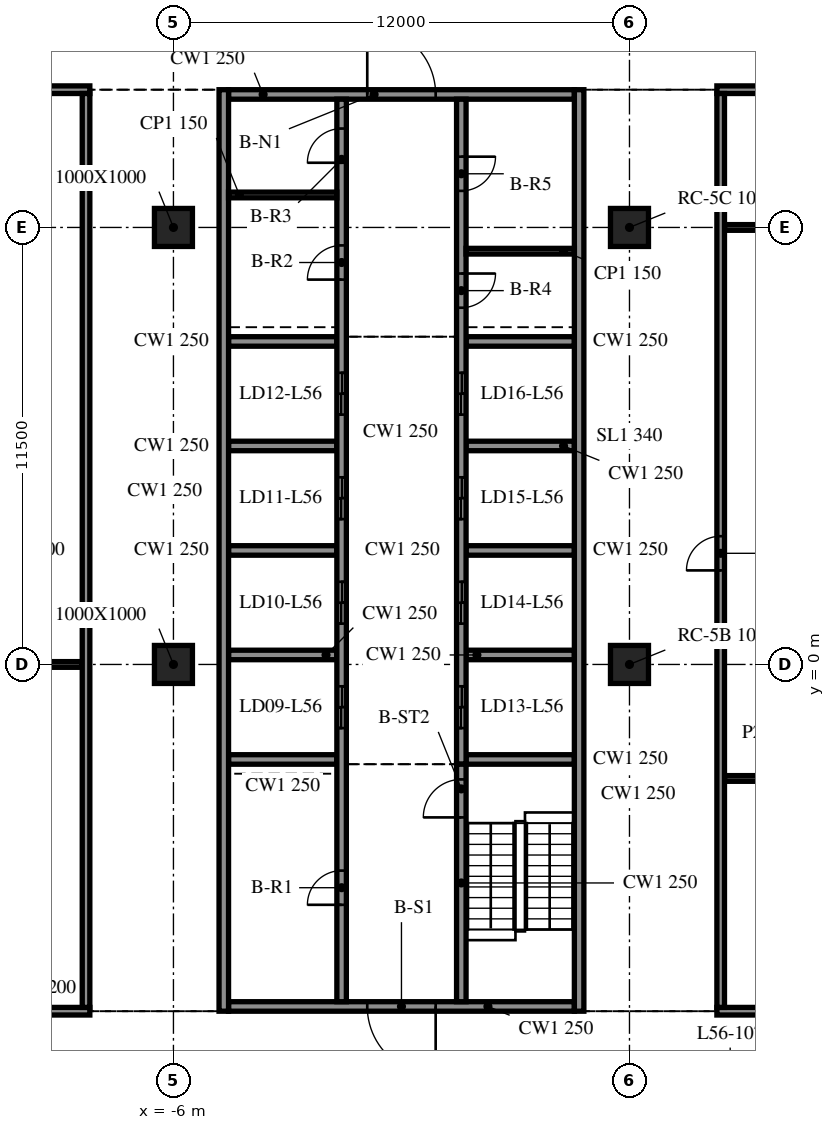
"""IFC4 building model, lengths in metres.
Left out: names, types, materials, properties, quantities, classifications, styles, units other than length and angle.
Written with IfcOpenShell. Run it as: python <this file> out.ifc"""

import sys

from ifc_helpers import new_model, si_unit, direction, frame, frame_2d, origin, origin_2d, place, context, subcontext, project, spatial, rectangle, extrude, element, fill, save


model = new_model("IFC4")
c1 = context("Model", 3, precision=1e-05, world=origin(), true_north=direction((0.0, 1.0)))
c2 = subcontext(c1, "Body", "Model", "MODEL_VIEW")
j1 = project(units=[si_unit("LENGTHUNIT", "METRE"), si_unit("PLANEANGLEUNIT", "RADIAN")], contexts=[c1])
p1 = place(None, origin())
s1 = spatial("IfcSite", under=j1, at=p1, CompositionType="ELEMENT")
p2 = place(p1, origin())
s2 = spatial("IfcBuilding", under=s1, at=p2, CompositionType="ELEMENT")
p3 = place(p2, frame((0.0, 0.0, 232.4)))
s3 = spatial("IfcBuildingStorey", under=s2, at=p3, CompositionType="ELEMENT", Elevation=232.4)
for number, where, z_axis, x_axis in (
    (1, (-6.0, 0.0, -0.34), (0.0, 0.0, 1.0), (1.0, 0.0, 0.0)),
    (2, (-6.0, 11.5, -0.34), (0.0, 0.0, 1.0), (1.0, 0.0, 0.0)),
    (3, (6.0, 0.0, -0.34), (0.0, 0.0, 1.0), (1.0, 0.0, 0.0)),
    (4, (6.0, 11.5, -0.34), (0.0, 0.0, 1.0), (1.0, 0.0, 0.0)),
):
    element("IfcColumn", number, at=place(p3, frame(where, z_axis=z_axis, x_axis=x_axis)), inside=s3, PredefinedType="COLUMN", context=c2, shape_type="SweptSolid", body=[
        extrude(rectangle(XDim=1.0, YDim=1.0, at=origin_2d()), origin(), (0.0, 0.0, 1.0), 3.8),
    ])
for number, where, z_axis, x_axis in (
    (5, (-4.675, 15.125, 0.0), (0.0, 0.0, 1.0), (0.0, -1.0, 0.0)),
    (6, (4.675, -9.125, 0.0), (0.0, 0.0, 1.0), (0.0, 1.0, 0.0)),
):
    element("IfcWall", number, at=place(p3, frame(where, z_axis=z_axis, x_axis=x_axis)), inside=s3, PredefinedType="SOLIDWALL", context=c2, shape_type="SweptSolid", body=[
        extrude(rectangle(XDim=24.25, YDim=0.25, at=frame_2d((12.125, 0.0))), origin(), (0.0, 0.0, 1.0), 3.46),
    ])
p4 = place(p3, frame((4.55, -9.0, 0.0), z_axis=(0.0, 0.0, 1.0), x_axis=(-1.0, 0.0, 0.0)))
e7 = element("IfcWall", 7, at=p4, inside=s3, PredefinedType="SOLIDWALL", context=c2, shape_type="SweptSolid", body=[
    extrude(rectangle(XDim=9.1, YDim=0.25, at=frame_2d((4.55, 0.0))), origin(), (0.0, 0.0, 1.0), 3.46),
])
p5 = place(p4, frame((3.65, 0.0, 0.0)))
e8 = element("IfcOpeningElement", 8, at=p5, cuts=e7, PredefinedType="OPENING", context=c2, shape_type="SweptSolid", body=[
    extrude(rectangle(XDim=1.8, YDim=2.1, at=frame_2d((0.9, 1.05))), frame((0.0, 0.135, 0.0), z_axis=(0.0, -1.0, 0.0), x_axis=(1.0, 0.0, 0.0)), (0.0, 0.0, 1.0), 0.27),
])
p6 = place(p3, frame((-4.55, 15.0, 0.0), z_axis=(0.0, 0.0, 1.0), x_axis=(1.0, 0.0, 0.0)))
e9 = element("IfcWall", 9, at=p6, inside=s3, PredefinedType="SOLIDWALL", context=c2, shape_type="SweptSolid", body=[
    extrude(rectangle(XDim=9.1, YDim=0.25, at=frame_2d((4.55, 0.0))), origin(), (0.0, 0.0, 1.0), 3.46),
])
p7 = place(p6, frame((3.65, 0.0, 0.0)))
e10 = element("IfcOpeningElement", 10, at=p7, cuts=e9, PredefinedType="OPENING", context=c2, shape_type="SweptSolid", body=[
    extrude(rectangle(XDim=1.8, YDim=2.1, at=frame_2d((0.9, 1.05))), frame((0.0, 0.135, 0.0), z_axis=(0.0, -1.0, 0.0), x_axis=(1.0, 0.0, 0.0)), (0.0, 0.0, 1.0), 0.27),
])
p8 = place(p3, frame((-1.575, -8.875, 0.0), z_axis=(0.0, 0.0, 1.0), x_axis=(0.0, 1.0, 0.0)))
e11 = element("IfcWall", 11, at=p8, inside=s3, PredefinedType="SOLIDWALL", context=c2, shape_type="SweptSolid", body=[
    extrude(rectangle(XDim=23.75, YDim=0.25, at=frame_2d((11.875, 0.0))), origin(), (0.0, 0.0, 1.0), 3.46),
])
p9 = place(p8, frame((7.2, 0.0, 0.0)))
e12 = element("IfcOpeningElement", 12, at=p9, cuts=e11, PredefinedType="OPENING", context=c2, shape_type="SweptSolid", body=[
    extrude(rectangle(XDim=1.1, YDim=2.1, at=frame_2d((0.55, 1.05))), frame((0.0, 0.135, 0.0), z_axis=(0.0, -1.0, 0.0), x_axis=(1.0, 0.0, 0.0)), (0.0, 0.0, 1.0), 0.27),
])
p10 = place(p8, frame((9.95, 0.0, 0.0)))
e13 = element("IfcOpeningElement", 13, at=p10, cuts=e11, PredefinedType="OPENING", context=c2, shape_type="SweptSolid", body=[
    extrude(rectangle(XDim=1.1, YDim=2.1, at=frame_2d((0.55, 1.05))), frame((0.0, 0.135, 0.0), z_axis=(0.0, -1.0, 0.0), x_axis=(1.0, 0.0, 0.0)), (0.0, 0.0, 1.0), 0.27),
])
p11 = place(p8, frame((12.7, 0.0, 0.0)))
e14 = element("IfcOpeningElement", 14, at=p11, cuts=e11, PredefinedType="OPENING", context=c2, shape_type="SweptSolid", body=[
    extrude(rectangle(XDim=1.1, YDim=2.1, at=frame_2d((0.55, 1.05))), frame((0.0, 0.135, 0.0), z_axis=(0.0, -1.0, 0.0), x_axis=(1.0, 0.0, 0.0)), (0.0, 0.0, 1.0), 0.27),
])
p12 = place(p8, frame((15.45, 0.0, 0.0)))
e15 = element("IfcOpeningElement", 15, at=p12, cuts=e11, PredefinedType="OPENING", context=c2, shape_type="SweptSolid", body=[
    extrude(rectangle(XDim=1.1, YDim=2.1, at=frame_2d((0.55, 1.05))), frame((0.0, 0.135, 0.0), z_axis=(0.0, -1.0, 0.0), x_axis=(1.0, 0.0, 0.0)), (0.0, 0.0, 1.0), 0.27),
])
p13 = place(p8, frame((2.55, 0.0, 0.0)))
e16 = element("IfcOpeningElement", 16, at=p13, cuts=e11, PredefinedType="OPENING", context=c2, shape_type="SweptSolid", body=[
    extrude(rectangle(XDim=0.9, YDim=2.1, at=frame_2d((0.45, 1.05))), frame((0.0, 0.135, 0.0), z_axis=(0.0, -1.0, 0.0), x_axis=(1.0, 0.0, 0.0)), (0.0, 0.0, 1.0), 0.27),
])
p14 = place(p8, frame((19.002, 0.0, 0.0)))
e17 = element("IfcOpeningElement", 17, at=p14, cuts=e11, PredefinedType="OPENING", context=c2, shape_type="SweptSolid", body=[
    extrude(rectangle(XDim=0.9, YDim=2.1, at=frame_2d((0.45, 1.05))), frame((0.0, 0.135, 0.0), z_axis=(0.0, -1.0, 0.0), x_axis=(1.0, 0.0, 0.0)), (0.0, 0.0, 1.0), 0.27),
])
p15 = place(p8, frame((22.077, 0.0, 0.0)))
e18 = element("IfcOpeningElement", 18, at=p15, cuts=e11, PredefinedType="OPENING", context=c2, shape_type="SweptSolid", body=[
    extrude(rectangle(XDim=0.9, YDim=2.1, at=frame_2d((0.45, 1.05))), frame((0.0, 0.135, 0.0), z_axis=(0.0, -1.0, 0.0), x_axis=(1.0, 0.0, 0.0)), (0.0, 0.0, 1.0), 0.27),
])
p16 = place(p3, frame((1.575, -8.875, 0.0), z_axis=(0.0, 0.0, 1.0), x_axis=(0.0, 1.0, 0.0)))
e19 = element("IfcWall", 19, at=p16, inside=s3, PredefinedType="SOLIDWALL", context=c2, shape_type="SweptSolid", body=[
    extrude(rectangle(XDim=6.25, YDim=0.25, at=frame_2d((3.125, 0.0))), origin(), (0.0, 0.0, 1.0), 3.46),
])
p17 = place(p16, frame((4.85, 0.0, 0.0)))
e20 = element("IfcOpeningElement", 20, at=p17, cuts=e19, PredefinedType="OPENING", context=c2, shape_type="SweptSolid", body=[
    extrude(rectangle(XDim=1.0, YDim=2.1, at=frame_2d((0.5, 1.05))), frame((0.0, 0.135, 0.0), z_axis=(0.0, -1.0, 0.0), x_axis=(1.0, 0.0, 0.0)), (0.0, 0.0, 1.0), 0.27),
])
p18 = place(p3, frame((1.575, 14.875, 0.0), z_axis=(0.0, 0.0, 1.0), x_axis=(0.0, -1.0, 0.0)))
e21 = element("IfcWall", 21, at=p18, inside=s3, PredefinedType="SOLIDWALL", context=c2, shape_type="SweptSolid", body=[
    extrude(rectangle(XDim=17.5, YDim=0.25, at=frame_2d((8.75, 0.0))), origin(), (0.0, 0.0, 1.0), 3.46),
])
p19 = place(p18, frame((15.45, 0.0, 0.0)))
e22 = element("IfcOpeningElement", 22, at=p19, cuts=e21, PredefinedType="OPENING", context=c2, shape_type="SweptSolid", body=[
    extrude(rectangle(XDim=1.1, YDim=2.1, at=frame_2d((0.55, 1.05))), frame((0.0, 0.135, 0.0), z_axis=(0.0, -1.0, 0.0), x_axis=(1.0, 0.0, 0.0)), (0.0, 0.0, 1.0), 0.27),
])
p20 = place(p18, frame((12.7, 0.0, 0.0)))
e23 = element("IfcOpeningElement", 23, at=p20, cuts=e21, PredefinedType="OPENING", context=c2, shape_type="SweptSolid", body=[
    extrude(rectangle(XDim=1.1, YDim=2.1, at=frame_2d((0.55, 1.05))), frame((0.0, 0.135, 0.0), z_axis=(0.0, -1.0, 0.0), x_axis=(1.0, 0.0, 0.0)), (0.0, 0.0, 1.0), 0.27),
])
p21 = place(p18, frame((9.95, 0.0, 0.0)))
e24 = element("IfcOpeningElement", 24, at=p21, cuts=e21, PredefinedType="OPENING", context=c2, shape_type="SweptSolid", body=[
    extrude(rectangle(XDim=1.1, YDim=2.1, at=frame_2d((0.55, 1.05))), frame((0.0, 0.135, 0.0), z_axis=(0.0, -1.0, 0.0), x_axis=(1.0, 0.0, 0.0)), (0.0, 0.0, 1.0), 0.27),
])
p22 = place(p18, frame((7.2, 0.0, 0.0)))
e25 = element("IfcOpeningElement", 25, at=p22, cuts=e21, PredefinedType="OPENING", context=c2, shape_type="SweptSolid", body=[
    extrude(rectangle(XDim=1.1, YDim=2.1, at=frame_2d((0.55, 1.05))), frame((0.0, 0.135, 0.0), z_axis=(0.0, -1.0, 0.0), x_axis=(1.0, 0.0, 0.0)), (0.0, 0.0, 1.0), 0.27),
])
p23 = place(p18, frame((4.587, 0.0, 0.0)))
e26 = element("IfcOpeningElement", 26, at=p23, cuts=e21, PredefinedType="OPENING", context=c2, shape_type="SweptSolid", body=[
    extrude(rectangle(XDim=0.9, YDim=2.1, at=frame_2d((0.45, 1.05))), frame((0.0, 0.135, 0.0), z_axis=(0.0, -1.0, 0.0), x_axis=(1.0, 0.0, 0.0)), (0.0, 0.0, 1.0), 0.27),
])
p24 = place(p18, frame((1.512, 0.0, 0.0)))
e27 = element("IfcOpeningElement", 27, at=p24, cuts=e21, PredefinedType="OPENING", context=c2, shape_type="SweptSolid", body=[
    extrude(rectangle(XDim=0.9, YDim=2.1, at=frame_2d((0.45, 1.05))), frame((0.0, 0.135, 0.0), z_axis=(0.0, -1.0, 0.0), x_axis=(1.0, 0.0, 0.0)), (0.0, 0.0, 1.0), 0.27),
])
for number, where, z_axis, x_axis in (
    (28, (-4.55, -2.5, 0.0), (0.0, 0.0, 1.0), (1.0, 0.0, 0.0)),
    (29, (-4.55, 0.25, 0.0), (0.0, 0.0, 1.0), (1.0, 0.0, 0.0)),
    (30, (-4.55, 3.0, 0.0), (0.0, 0.0, 1.0), (1.0, 0.0, 0.0)),
    (31, (-4.55, 5.75, 0.0), (0.0, 0.0, 1.0), (1.0, 0.0, 0.0)),
    (32, (-4.55, 8.5, 0.0), (0.0, 0.0, 1.0), (1.0, 0.0, 0.0)),
    (33, (1.7, -2.5, 0.0), (0.0, 0.0, 1.0), (1.0, 0.0, 0.0)),
    (34, (1.7, 0.25, 0.0), (0.0, 0.0, 1.0), (1.0, 0.0, 0.0)),
    (35, (1.7, 3.0, 0.0), (0.0, 0.0, 1.0), (1.0, 0.0, 0.0)),
    (36, (1.7, 5.75, 0.0), (0.0, 0.0, 1.0), (1.0, 0.0, 0.0)),
    (37, (1.7, 8.5, 0.0), (0.0, 0.0, 1.0), (1.0, 0.0, 0.0)),
):
    element("IfcWall", number, at=place(p3, frame(where, z_axis=z_axis, x_axis=x_axis)), inside=s3, PredefinedType="SOLIDWALL", context=c2, shape_type="SweptSolid", body=[
        extrude(rectangle(XDim=2.85, YDim=0.25, at=frame_2d((1.425, 0.0))), origin(), (0.0, 0.0, 1.0), 3.46),
    ])
for number, where, z_axis, x_axis in (
    (38, (-4.55, 12.355, 0.0), (0.0, 0.0, 1.0), (1.0, 0.0, 0.0)),
    (39, (1.7, 10.875, 0.0), (0.0, 0.0, 1.0), (1.0, 0.0, 0.0)),
):
    element("IfcWall", number, at=place(p3, frame(where, z_axis=z_axis, x_axis=x_axis)), inside=s3, PredefinedType="PARTITIONING", context=c2, shape_type="SweptSolid", body=[
        extrude(rectangle(XDim=2.85, YDim=0.15, at=frame_2d((1.425, 0.0))), origin(), (0.0, 0.0, 1.0), 3.46),
    ])
p25 = place(p3, frame((-15.9, -9.125, 0.0), z_axis=(0.0, 0.0, 1.0), x_axis=(1.0, 0.0, 0.0)))
e40 = element("IfcWall", 40, at=p25, inside=s3, PredefinedType="PARTITIONING", context=c2, shape_type="SweptSolid", body=[
    extrude(rectangle(XDim=7.7, YDim=0.2, at=frame_2d((3.85, 0.0))), origin(), (0.0, 0.0, 1.0), 3.46),
])
p26 = place(p25, frame((3.3, 0.0, 0.0)))
e41 = element("IfcOpeningElement", 41, at=p26, cuts=e40, PredefinedType="OPENING", context=c2, shape_type="SweptSolid", body=[
    extrude(rectangle(XDim=0.9, YDim=2.1, at=frame_2d((0.45, 1.05))), frame((0.0, 0.11, 0.0), z_axis=(0.0, -1.0, 0.0), x_axis=(1.0, 0.0, 0.0)), (0.0, 0.0, 1.0), 0.22),
])
p27 = place(p3, frame((8.3, -9.125, 0.0), z_axis=(0.0, 0.0, 1.0), x_axis=(1.0, 0.0, 0.0)))
e42 = element("IfcWall", 42, at=p27, inside=s3, PredefinedType="PARTITIONING", context=c2, shape_type="SweptSolid", body=[
    extrude(rectangle(XDim=7.3, YDim=0.2, at=frame_2d((3.65, 0.0))), origin(), (0.0, 0.0, 1.0), 3.46),
])
p28 = place(p27, frame((3.1, 0.0, 0.0)))
e43 = element("IfcOpeningElement", 43, at=p28, cuts=e42, PredefinedType="OPENING", context=c2, shape_type="SweptSolid", body=[
    extrude(rectangle(XDim=0.9, YDim=2.1, at=frame_2d((0.45, 1.05))), frame((0.0, 0.11, 0.0), z_axis=(0.0, -1.0, 0.0), x_axis=(1.0, 0.0, 0.0)), (0.0, 0.0, 1.0), 0.22),
])
p29 = place(p3, frame((8.5, -3.0, 0.0), z_axis=(0.0, 0.0, 1.0), x_axis=(1.0, 0.0, 0.0)))
e44 = element("IfcWall", 44, at=p29, inside=s3, PredefinedType="PARTITIONING", context=c2, shape_type="SweptSolid", body=[
    extrude(rectangle(XDim=6.9, YDim=0.15, at=frame_2d((3.45, 0.0))), origin(), (0.0, 0.0, 1.0), 3.46),
])
p30 = place(p3, frame((-15.7, 0.0, 0.0), z_axis=(0.0, 0.0, 1.0), x_axis=(1.0, 0.0, 0.0)))
e45 = element("IfcWall", 45, at=p30, inside=s3, PredefinedType="PARTITIONING", context=c2, shape_type="SweptSolid", body=[
    extrude(rectangle(XDim=7.3, YDim=0.15, at=frame_2d((3.65, 0.0))), origin(), (0.0, 0.0, 1.0), 3.46),
])
p31 = place(p3, frame((8.5, 11.5, 0.0), z_axis=(0.0, 0.0, 1.0), x_axis=(1.0, 0.0, 0.0)))
e46 = element("IfcWall", 46, at=p31, inside=s3, PredefinedType="PARTITIONING", context=c2, shape_type="SweptSolid", body=[
    extrude(rectangle(XDim=6.9, YDim=0.15, at=frame_2d((3.45, 0.0))), origin(), (0.0, 0.0, 1.0), 3.46),
])
p32 = place(p3, frame((-15.9, 15.125, 0.0), z_axis=(0.0, 0.0, 1.0), x_axis=(1.0, 0.0, 0.0)))
e47 = element("IfcWall", 47, at=p32, inside=s3, PredefinedType="PARTITIONING", context=c2, shape_type="SweptSolid", body=[
    extrude(rectangle(XDim=7.7, YDim=0.2, at=frame_2d((3.85, 0.0))), origin(), (0.0, 0.0, 1.0), 3.46),
])
p33 = place(p3, frame((8.3, 15.125, 0.0), z_axis=(0.0, 0.0, 1.0), x_axis=(1.0, 0.0, 0.0)))
e48 = element("IfcWall", 48, at=p33, inside=s3, PredefinedType="PARTITIONING", context=c2, shape_type="SweptSolid", body=[
    extrude(rectangle(XDim=7.3, YDim=0.2, at=frame_2d((3.65, 0.0))), origin(), (0.0, 0.0, 1.0), 3.46),
])
p34 = place(p33, frame((3.1, 0.0, 0.0)))
e49 = element("IfcOpeningElement", 49, at=p34, cuts=e48, PredefinedType="OPENING", context=c2, shape_type="SweptSolid", body=[
    extrude(rectangle(XDim=0.9, YDim=2.1, at=frame_2d((0.45, 1.05))), frame((0.0, 0.11, 0.0), z_axis=(0.0, -1.0, 0.0), x_axis=(1.0, 0.0, 0.0)), (0.0, 0.0, 1.0), 0.22),
])
p35 = place(p3, frame((-8.3, -9.025, 0.0), z_axis=(0.0, 0.0, 1.0), x_axis=(0.0, 1.0, 0.0)))
e50 = element("IfcWall", 50, at=p35, inside=s3, PredefinedType="PARTITIONING", context=c2, shape_type="SweptSolid", body=[
    extrude(rectangle(XDim=24.05, YDim=0.2, at=frame_2d((12.025, 0.0))), origin(), (0.0, 0.0, 1.0), 3.46),
])
p36 = place(p3, frame((8.4, -9.025, 0.0), z_axis=(0.0, 0.0, 1.0), x_axis=(0.0, 1.0, 0.0)))
e51 = element("IfcWall", 51, at=p36, inside=s3, PredefinedType="PARTITIONING", context=c2, shape_type="SweptSolid", body=[
    extrude(rectangle(XDim=24.05, YDim=0.2, at=frame_2d((12.025, 0.0))), origin(), (0.0, 0.0, 1.0), 3.46),
])
p37 = place(p36, frame((11.5, 0.0, 0.0)))
e52 = element("IfcOpeningElement", 52, at=p37, cuts=e51, PredefinedType="OPENING", context=c2, shape_type="SweptSolid", body=[
    extrude(rectangle(XDim=0.9, YDim=2.1, at=frame_2d((0.45, 1.05))), frame((0.0, 0.11, 0.0), z_axis=(0.0, -1.0, 0.0), x_axis=(1.0, 0.0, 0.0)), (0.0, 0.0, 1.0), 0.22),
])
p38 = place(p5, origin())
e53 = element("IfcDoor", 53, at=p38, inside=s3, OperationType="DOUBLE_DOOR_SINGLE_SWING", PredefinedType="DOOR", context=c2, shape_type="SweptSolid", body=[
    extrude(rectangle(XDim=1.8, YDim=2.1, at=frame_2d((0.9, 1.05))), frame((0.0, 0.025, 0.0), z_axis=(0.0, -1.0, 0.0), x_axis=(1.0, 0.0, 0.0)), (0.0, 0.0, 1.0), 0.05),
])
fill(e8, e53)
p39 = place(p7, origin())
e54 = element("IfcDoor", 54, at=p39, inside=s3, OperationType="DOUBLE_DOOR_SINGLE_SWING", PredefinedType="DOOR", context=c2, shape_type="SweptSolid", body=[
    extrude(rectangle(XDim=1.8, YDim=2.1, at=frame_2d((0.9, 1.05))), frame((0.0, 0.025, 0.0), z_axis=(0.0, -1.0, 0.0), x_axis=(1.0, 0.0, 0.0)), (0.0, 0.0, 1.0), 0.05),
])
fill(e10, e54)
p40 = place(p19, origin())
e55 = element("IfcDoor", 55, at=p40, inside=s3, OperationType="DOUBLE_DOOR_SLIDING", PredefinedType="DOOR", context=c2, shape_type="SweptSolid", body=[
    extrude(rectangle(XDim=1.1, YDim=2.1, at=frame_2d((0.55, 1.05))), frame((0.0, 0.025, 0.0), z_axis=(0.0, -1.0, 0.0), x_axis=(1.0, 0.0, 0.0)), (0.0, 0.0, 1.0), 0.05),
])
fill(e22, e55)
p41 = place(p20, origin())
e56 = element("IfcDoor", 56, at=p41, inside=s3, OperationType="DOUBLE_DOOR_SLIDING", PredefinedType="DOOR", context=c2, shape_type="SweptSolid", body=[
    extrude(rectangle(XDim=1.1, YDim=2.1, at=frame_2d((0.55, 1.05))), frame((0.0, 0.025, 0.0), z_axis=(0.0, -1.0, 0.0), x_axis=(1.0, 0.0, 0.0)), (0.0, 0.0, 1.0), 0.05),
])
fill(e23, e56)
p42 = place(p21, origin())
e57 = element("IfcDoor", 57, at=p42, inside=s3, OperationType="DOUBLE_DOOR_SLIDING", PredefinedType="DOOR", context=c2, shape_type="SweptSolid", body=[
    extrude(rectangle(XDim=1.1, YDim=2.1, at=frame_2d((0.55, 1.05))), frame((0.0, 0.025, 0.0), z_axis=(0.0, -1.0, 0.0), x_axis=(1.0, 0.0, 0.0)), (0.0, 0.0, 1.0), 0.05),
])
fill(e24, e57)
p43 = place(p22, origin())
e58 = element("IfcDoor", 58, at=p43, inside=s3, OperationType="DOUBLE_DOOR_SLIDING", PredefinedType="DOOR", context=c2, shape_type="SweptSolid", body=[
    extrude(rectangle(XDim=1.1, YDim=2.1, at=frame_2d((0.55, 1.05))), frame((0.0, 0.025, 0.0), z_axis=(0.0, -1.0, 0.0), x_axis=(1.0, 0.0, 0.0)), (0.0, 0.0, 1.0), 0.05),
])
fill(e25, e58)
p44 = place(p9, origin())
e59 = element("IfcDoor", 59, at=p44, inside=s3, OperationType="DOUBLE_DOOR_SLIDING", PredefinedType="DOOR", context=c2, shape_type="SweptSolid", body=[
    extrude(rectangle(XDim=1.1, YDim=2.1, at=frame_2d((0.55, 1.05))), frame((0.0, 0.025, 0.0), z_axis=(0.0, -1.0, 0.0), x_axis=(1.0, 0.0, 0.0)), (0.0, 0.0, 1.0), 0.05),
])
fill(e12, e59)
p45 = place(p10, origin())
e60 = element("IfcDoor", 60, at=p45, inside=s3, OperationType="DOUBLE_DOOR_SLIDING", PredefinedType="DOOR", context=c2, shape_type="SweptSolid", body=[
    extrude(rectangle(XDim=1.1, YDim=2.1, at=frame_2d((0.55, 1.05))), frame((0.0, 0.025, 0.0), z_axis=(0.0, -1.0, 0.0), x_axis=(1.0, 0.0, 0.0)), (0.0, 0.0, 1.0), 0.05),
])
fill(e13, e60)
p46 = place(p11, origin())
e61 = element("IfcDoor", 61, at=p46, inside=s3, OperationType="DOUBLE_DOOR_SLIDING", PredefinedType="DOOR", context=c2, shape_type="SweptSolid", body=[
    extrude(rectangle(XDim=1.1, YDim=2.1, at=frame_2d((0.55, 1.05))), frame((0.0, 0.025, 0.0), z_axis=(0.0, -1.0, 0.0), x_axis=(1.0, 0.0, 0.0)), (0.0, 0.0, 1.0), 0.05),
])
fill(e14, e61)
p47 = place(p12, origin())
e62 = element("IfcDoor", 62, at=p47, inside=s3, OperationType="DOUBLE_DOOR_SLIDING", PredefinedType="DOOR", context=c2, shape_type="SweptSolid", body=[
    extrude(rectangle(XDim=1.1, YDim=2.1, at=frame_2d((0.55, 1.05))), frame((0.0, 0.025, 0.0), z_axis=(0.0, -1.0, 0.0), x_axis=(1.0, 0.0, 0.0)), (0.0, 0.0, 1.0), 0.05),
])
fill(e15, e62)
p48 = place(p13, origin())
e63 = element("IfcDoor", 63, at=p48, inside=s3, OperationType="SINGLE_SWING_LEFT", PredefinedType="DOOR", context=c2, shape_type="SweptSolid", body=[
    extrude(rectangle(XDim=0.9, YDim=2.1, at=frame_2d((0.45, 1.05))), frame((0.0, 0.025, 0.0), z_axis=(0.0, -1.0, 0.0), x_axis=(1.0, 0.0, 0.0)), (0.0, 0.0, 1.0), 0.05),
])
fill(e16, e63)
p49 = place(p14, origin())
e64 = element("IfcDoor", 64, at=p49, inside=s3, OperationType="SINGLE_SWING_RIGHT", PredefinedType="DOOR", context=c2, shape_type="SweptSolid", body=[
    extrude(rectangle(XDim=0.9, YDim=2.1, at=frame_2d((0.45, 1.05))), frame((0.0, 0.025, 0.0), z_axis=(0.0, -1.0, 0.0), x_axis=(1.0, 0.0, 0.0)), (0.0, 0.0, 1.0), 0.05),
])
fill(e17, e64)
p50 = place(p15, origin())
e65 = element("IfcDoor", 65, at=p50, inside=s3, OperationType="SINGLE_SWING_LEFT", PredefinedType="DOOR", context=c2, shape_type="SweptSolid", body=[
    extrude(rectangle(XDim=0.9, YDim=2.1, at=frame_2d((0.45, 1.05))), frame((0.0, 0.025, 0.0), z_axis=(0.0, -1.0, 0.0), x_axis=(1.0, 0.0, 0.0)), (0.0, 0.0, 1.0), 0.05),
])
fill(e18, e65)
p51 = place(p23, origin())
e66 = element("IfcDoor", 66, at=p51, inside=s3, OperationType="SINGLE_SWING_RIGHT", PredefinedType="DOOR", context=c2, shape_type="SweptSolid", body=[
    extrude(rectangle(XDim=0.9, YDim=2.1, at=frame_2d((0.45, 1.05))), frame((0.0, 0.025, 0.0), z_axis=(0.0, -1.0, 0.0), x_axis=(1.0, 0.0, 0.0)), (0.0, 0.0, 1.0), 0.05),
])
fill(e26, e66)
p52 = place(p24, origin())
e67 = element("IfcDoor", 67, at=p52, inside=s3, OperationType="SINGLE_SWING_LEFT", PredefinedType="DOOR", context=c2, shape_type="SweptSolid", body=[
    extrude(rectangle(XDim=0.9, YDim=2.1, at=frame_2d((0.45, 1.05))), frame((0.0, 0.025, 0.0), z_axis=(0.0, -1.0, 0.0), x_axis=(1.0, 0.0, 0.0)), (0.0, 0.0, 1.0), 0.05),
])
fill(e27, e67)
p53 = place(p17, origin())
e68 = element("IfcDoor", 68, at=p53, inside=s3, OperationType="SINGLE_SWING_RIGHT", PredefinedType="DOOR", context=c2, shape_type="SweptSolid", body=[
    extrude(rectangle(XDim=1.0, YDim=2.1, at=frame_2d((0.5, 1.05))), frame((0.0, 0.025, 0.0), z_axis=(0.0, -1.0, 0.0), x_axis=(1.0, 0.0, 0.0)), (0.0, 0.0, 1.0), 0.05),
])
fill(e20, e68)
p54 = place(p37, origin())
e69 = element("IfcDoor", 69, at=p54, inside=s3, OperationType="SINGLE_SWING_RIGHT", PredefinedType="DOOR", context=c2, shape_type="SweptSolid", body=[
    extrude(rectangle(XDim=0.9, YDim=2.1, at=frame_2d((0.45, 1.05))), frame((0.0, 0.025, 0.0), z_axis=(0.0, -1.0, 0.0), x_axis=(1.0, 0.0, 0.0)), (0.0, 0.0, 1.0), 0.05),
])
fill(e52, e69)
save(model, sys.argv[1])
